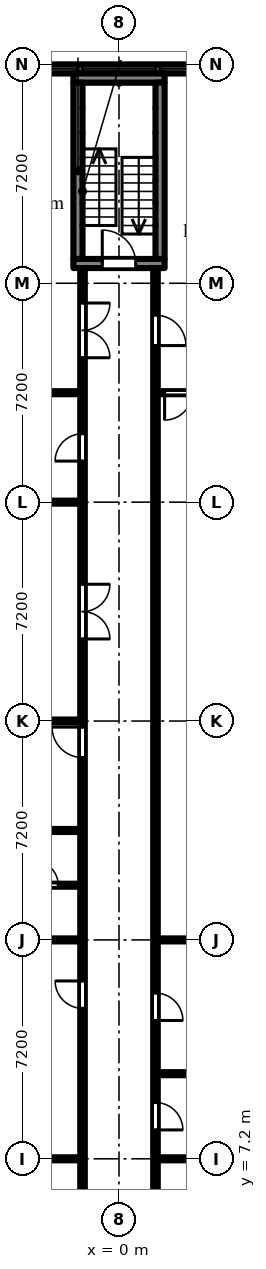
"""IFC4 building model, lengths in metres.
Left out: names, types, materials, properties, quantities, classifications, styles, units other than length and angle.
Written with IfcOpenShell. Run it as: python <this file> out.ifc"""

import sys

from ifc_helpers import new_model, si_unit, direction, frame, frame_2d, origin, place, context, subcontext, project, spatial, rectangle, extrude, element, fill, save


model = new_model("IFC4")
c1 = context("Model", 3, precision=1e-05, world=origin(), true_north=direction((0.0, 1.0)))
c2 = subcontext(c1, "Body", "Model", "MODEL_VIEW")
j1 = project(units=[si_unit("LENGTHUNIT", "METRE"), si_unit("PLANEANGLEUNIT", "RADIAN")], contexts=[c1])
p1 = place(None, origin())
s1 = spatial("IfcSite", under=j1, at=p1, CompositionType="ELEMENT")
p2 = place(p1, origin())
s2 = spatial("IfcBuilding", under=s1, at=p2, CompositionType="ELEMENT")
p3 = place(p2, frame((0.0, 0.0, 35.7)))
s3 = spatial("IfcBuildingStorey", under=s2, at=p3, CompositionType="ELEMENT", Elevation=35.7)
p4 = place(p3, frame((2.7, 43.05, 0.0), z_axis=(0.0, 0.0, 1.0), x_axis=(-1.0, 0.0, 0.0)))
e1 = element("IfcWall", 1, at=p4, inside=s3, PredefinedType="SOLIDWALL", context=c2, shape_type="SweptSolid", body=[
    extrude(rectangle(XDim=5.4, YDim=0.3, at=frame_2d((2.7, 0.0))), origin(), (0.0, 0.0, 1.0), 2.1),
])
p5 = place(p4, frame((1.5, 0.0, 0.2)))
e2 = element("IfcOpeningElement", 2, at=p5, cuts=e1, PredefinedType="OPENING", context=c2, shape_type="SweptSolid", body=[
    extrude(rectangle(XDim=2.4, YDim=1.85, at=frame_2d((1.2, 0.925))), frame((0.0, 0.16, 0.0), z_axis=(0.0, -1.0, 0.0), x_axis=(1.0, 0.0, 0.0)), (0.0, 0.0, 1.0), 0.32),
])
p6 = place(p4, frame((0.15, 0.0, 0.2)))
e3 = element("IfcOpeningElement", 3, at=p6, cuts=e1, PredefinedType="OPENING", context=c2, shape_type="SweptSolid", body=[
    extrude(rectangle(XDim=1.2, YDim=1.85, at=frame_2d((0.6, 0.925))), frame((0.0, 0.16, 0.0), z_axis=(0.0, -1.0, 0.0), x_axis=(1.0, 0.0, 0.0)), (0.0, 0.0, 1.0), 0.32),
])
p7 = place(p4, frame((4.05, 0.0, 0.2)))
e4 = element("IfcOpeningElement", 4, at=p7, cuts=e1, PredefinedType="OPENING", context=c2, shape_type="SweptSolid", body=[
    extrude(rectangle(XDim=1.2, YDim=1.85, at=frame_2d((0.6, 0.925))), frame((0.0, 0.16, 0.0), z_axis=(0.0, -1.0, 0.0), x_axis=(1.0, 0.0, 0.0)), (0.0, 0.0, 1.0), 0.32),
])
p8 = place(p3, frame((-1.5, 36.65, 0.0), z_axis=(0.0, 0.0, 1.0), x_axis=(1.0, 0.0, 0.0)))
e5 = element("IfcWall", 5, at=p8, inside=s3, PredefinedType="SHEAR", context=c2, shape_type="SweptSolid", body=[
    extrude(rectangle(XDim=3.0, YDim=0.3, at=frame_2d((1.5, 0.0))), origin(), (0.0, 0.0, 1.0), 2.575),
])
p9 = place(p8, frame((0.95, 0.0, 0.0)))
e6 = element("IfcOpeningElement", 6, at=p9, cuts=e5, PredefinedType="OPENING", context=c2, shape_type="SweptSolid", body=[
    extrude(rectangle(XDim=1.1, YDim=2.1, at=frame_2d((0.55, 1.05))), frame((0.0, 0.16, 0.0), z_axis=(0.0, -1.0, 0.0), x_axis=(1.0, 0.0, 0.0)), (0.0, 0.0, 1.0), 0.32),
])
p10 = place(p3, frame((-1.5, 42.75, 0.0), z_axis=(0.0, 0.0, 1.0), x_axis=(1.0, 0.0, 0.0)))
e7 = element("IfcWall", 7, at=p10, inside=s3, PredefinedType="SHEAR", context=c2, shape_type="SweptSolid", body=[
    extrude(rectangle(XDim=3.0, YDim=0.3, at=frame_2d((1.5, 0.0))), origin(), (0.0, 0.0, 1.0), 2.575),
])
for number, where, z_axis, x_axis in (
    (8, (-1.35, 36.8, 0.0), (0.0, 0.0, 1.0), (0.0, 1.0, 0.0)),
    (9, (1.35, 36.8, 0.0), (0.0, 0.0, 1.0), (0.0, 1.0, 0.0)),
):
    element("IfcWall", number, at=place(p3, frame(where, z_axis=z_axis, x_axis=x_axis)), inside=s3, PredefinedType="SHEAR", context=c2, shape_type="SweptSolid", body=[
        extrude(rectangle(XDim=5.8, YDim=0.3, at=frame_2d((2.9, 0.0))), origin(), (0.0, 0.0, 1.0), 2.575),
    ])
for number, where, z_axis, x_axis in (
    (10, (-6.9, 21.6, 0.0), (0.0, 0.0, 1.0), (1.0, 0.0, 0.0)),
    (11, (-6.9, 28.8, 0.0), (0.0, 0.0, 1.0), (1.0, 0.0, 0.0)),
    (12, (-6.9, 32.4, 0.0), (0.0, 0.0, 1.0), (1.0, 0.0, 0.0)),
):
    element("IfcWall", number, at=place(p3, frame(where, z_axis=z_axis, x_axis=x_axis)), inside=s3, PredefinedType="PARTITIONING", context=c2, shape_type="SweptSolid", body=[
        extrude(rectangle(XDim=5.625, YDim=0.1, at=frame_2d((2.812, 0.0))), origin(), (0.0, 0.0, 1.0), 2.575),
    ])
for number, where, z_axis, x_axis in (
    (13, (-3.9, 7.2, 0.0), (0.0, 0.0, 1.0), (1.0, 0.0, 0.0)),
    (14, (-3.9, 14.4, 0.0), (0.0, 0.0, 1.0), (1.0, 0.0, 0.0)),
):
    element("IfcWall", number, at=place(p3, frame(where, z_axis=z_axis, x_axis=x_axis)), inside=s3, PredefinedType="PARTITIONING", context=c2, shape_type="SweptSolid", body=[
        extrude(rectangle(XDim=2.625, YDim=0.1, at=frame_2d((1.312, 0.0))), origin(), (0.0, 0.0, 1.0), 2.575),
    ])
p11 = place(p3, frame((-3.55, 16.2, 0.0), z_axis=(0.0, 0.0, 1.0), x_axis=(1.0, 0.0, 0.0)))
e15 = element("IfcWall", 15, at=p11, inside=s3, PredefinedType="PARTITIONING", context=c2, shape_type="SweptSolid", body=[
    extrude(rectangle(XDim=2.275, YDim=0.1, at=frame_2d((1.138, 0.0))), origin(), (0.0, 0.0, 1.0), 2.575),
])
p12 = place(p11, frame((0.75, 0.0, 0.0)))
e16 = element("IfcOpeningElement", 16, at=p12, cuts=e15, PredefinedType="OPENING", context=c2, shape_type="SweptSolid", body=[
    extrude(rectangle(XDim=0.8, YDim=2.1, at=frame_2d((0.4, 1.05))), frame((0.0, 0.06, 0.0), z_axis=(0.0, -1.0, 0.0), x_axis=(1.0, 0.0, 0.0)), (0.0, 0.0, 1.0), 0.12),
])
p13 = place(p3, frame((-3.55, 18.0, 0.0), z_axis=(0.0, 0.0, 1.0), x_axis=(1.0, 0.0, 0.0)))
e17 = element("IfcWall", 17, at=p13, inside=s3, PredefinedType="PARTITIONING", context=c2, shape_type="SweptSolid", body=[
    extrude(rectangle(XDim=2.275, YDim=0.1, at=frame_2d((1.138, 0.0))), origin(), (0.0, 0.0, 1.0), 2.575),
])
p14 = place(p3, frame((-1.2, 1.275, 0.0), z_axis=(0.0, 0.0, 1.0), x_axis=(0.0, 1.0, 0.0)))
e18 = element("IfcWall", 18, at=p14, inside=s3, PredefinedType="PARTITIONING", context=c2, shape_type="SweptSolid", body=[
    extrude(rectangle(XDim=35.225, YDim=0.15, at=frame_2d((17.613, 0.0))), origin(), (0.0, 0.0, 1.0), 2.575),
])
p15 = place(p14, frame((3.575, 0.0, 0.0)))
e19 = element("IfcOpeningElement", 19, at=p15, cuts=e18, PredefinedType="OPENING", context=c2, shape_type="SweptSolid", body=[
    extrude(rectangle(XDim=0.9, YDim=2.1, at=frame_2d((0.45, 1.05))), frame((0.0, 0.085, 0.0), z_axis=(0.0, -1.0, 0.0), x_axis=(1.0, 0.0, 0.0)), (0.0, 0.0, 1.0), 0.17),
])
p16 = place(p14, frame((10.875, 0.0, 0.0)))
e20 = element("IfcOpeningElement", 20, at=p16, cuts=e18, PredefinedType="OPENING", context=c2, shape_type="SweptSolid", body=[
    extrude(rectangle(XDim=0.9, YDim=2.1, at=frame_2d((0.45, 1.05))), frame((0.0, 0.085, 0.0), z_axis=(0.0, -1.0, 0.0), x_axis=(1.0, 0.0, 0.0)), (0.0, 0.0, 1.0), 0.17),
])
p17 = place(p14, frame((19.125, 0.0, 0.0)))
e21 = element("IfcOpeningElement", 21, at=p17, cuts=e18, PredefinedType="OPENING", context=c2, shape_type="SweptSolid", body=[
    extrude(rectangle(XDim=1.0, YDim=2.1, at=frame_2d((0.5, 1.05))), frame((0.0, 0.085, 0.0), z_axis=(0.0, -1.0, 0.0), x_axis=(1.0, 0.0, 0.0)), (0.0, 0.0, 1.0), 0.17),
])
p18 = place(p14, frame((23.025, 0.0, 0.0)))
e22 = element("IfcOpeningElement", 22, at=p18, cuts=e18, PredefinedType="OPENING", context=c2, shape_type="SweptSolid", body=[
    extrude(rectangle(XDim=1.8, YDim=2.1, at=frame_2d((0.9, 1.05))), frame((0.0, 0.085, 0.0), z_axis=(0.0, -1.0, 0.0), x_axis=(1.0, 0.0, 0.0)), (0.0, 0.0, 1.0), 0.17),
])
p19 = place(p14, frame((28.875, 0.0, 0.0)))
e23 = element("IfcOpeningElement", 23, at=p19, cuts=e18, PredefinedType="OPENING", context=c2, shape_type="SweptSolid", body=[
    extrude(rectangle(XDim=0.9, YDim=2.1, at=frame_2d((0.45, 1.05))), frame((0.0, 0.085, 0.0), z_axis=(0.0, -1.0, 0.0), x_axis=(1.0, 0.0, 0.0)), (0.0, 0.0, 1.0), 0.17),
])
p20 = place(p14, frame((32.275, 0.0, 0.0)))
e24 = element("IfcOpeningElement", 24, at=p20, cuts=e18, PredefinedType="OPENING", context=c2, shape_type="SweptSolid", body=[
    extrude(rectangle(XDim=1.8, YDim=2.1, at=frame_2d((0.9, 1.05))), frame((0.0, 0.085, 0.0), z_axis=(0.0, -1.0, 0.0), x_axis=(1.0, 0.0, 0.0)), (0.0, 0.0, 1.0), 0.17),
])
p21 = place(p3, frame((1.2, 1.125, 0.0), z_axis=(0.0, 0.0, 1.0), x_axis=(0.0, 1.0, 0.0)))
e25 = element("IfcWall", 25, at=p21, inside=s3, PredefinedType="PARTITIONING", context=c2, shape_type="SweptSolid", body=[
    extrude(rectangle(XDim=35.375, YDim=0.15, at=frame_2d((17.688, 0.0))), origin(), (0.0, 0.0, 1.0), 2.575),
])
p22 = place(p21, frame((4.125, 0.0, 0.0)))
e26 = element("IfcOpeningElement", 26, at=p22, cuts=e25, PredefinedType="OPENING", context=c2, shape_type="SweptSolid", body=[
    extrude(rectangle(XDim=0.9, YDim=2.1, at=frame_2d((0.45, 1.05))), frame((0.0, 0.085, 0.0), z_axis=(0.0, -1.0, 0.0), x_axis=(1.0, 0.0, 0.0)), (0.0, 0.0, 1.0), 0.17),
])
p23 = place(p21, frame((7.025, 0.0, 0.0)))
e27 = element("IfcOpeningElement", 27, at=p23, cuts=e25, PredefinedType="OPENING", context=c2, shape_type="SweptSolid", body=[
    extrude(rectangle(XDim=0.9, YDim=2.1, at=frame_2d((0.45, 1.05))), frame((0.0, 0.085, 0.0), z_axis=(0.0, -1.0, 0.0), x_axis=(1.0, 0.0, 0.0)), (0.0, 0.0, 1.0), 0.17),
])
p24 = place(p21, frame((10.625, 0.0, 0.0)))
e28 = element("IfcOpeningElement", 28, at=p24, cuts=e25, PredefinedType="OPENING", context=c2, shape_type="SweptSolid", body=[
    extrude(rectangle(XDim=0.9, YDim=2.1, at=frame_2d((0.45, 1.05))), frame((0.0, 0.085, 0.0), z_axis=(0.0, -1.0, 0.0), x_axis=(1.0, 0.0, 0.0)), (0.0, 0.0, 1.0), 0.17),
])
p25 = place(p21, frame((32.825, 0.0, 0.0)))
e29 = element("IfcOpeningElement", 29, at=p25, cuts=e25, PredefinedType="OPENING", context=c2, shape_type="SweptSolid", body=[
    extrude(rectangle(XDim=1.0, YDim=2.1, at=frame_2d((0.5, 1.05))), frame((0.0, 0.085, 0.0), z_axis=(0.0, -1.0, 0.0), x_axis=(1.0, 0.0, 0.0)), (0.0, 0.0, 1.0), 0.17),
])
for number, where, z_axis, x_axis in (
    (30, (1.275, 7.2, 0.0), (0.0, 0.0, 1.0), (1.0, 0.0, 0.0)),
    (31, (1.275, 10.0, 0.0), (0.0, 0.0, 1.0), (1.0, 0.0, 0.0)),
):
    element("IfcWall", number, at=place(p3, frame(where, z_axis=z_axis, x_axis=x_axis)), inside=s3, PredefinedType="PARTITIONING", context=c2, shape_type="SweptSolid", body=[
        extrude(rectangle(XDim=2.625, YDim=0.1, at=frame_2d((1.312, 0.0))), origin(), (0.0, 0.0, 1.0), 2.575),
    ])
p26 = place(p3, frame((1.275, 14.4, 0.0), z_axis=(0.0, 0.0, 1.0), x_axis=(1.0, 0.0, 0.0)))
e32 = element("IfcWall", 32, at=p26, inside=s3, PredefinedType="PARTITIONING", context=c2, shape_type="SweptSolid", body=[
    extrude(rectangle(XDim=1.425, YDim=0.1, at=frame_2d((0.712, 0.0))), origin(), (0.0, 0.0, 1.0), 2.575),
])
p27 = place(p3, frame((1.275, 32.4, 0.0), z_axis=(0.0, 0.0, 1.0), x_axis=(1.0, 0.0, 0.0)))
e33 = element("IfcWall", 33, at=p27, inside=s3, PredefinedType="PARTITIONING", context=c2, shape_type="SweptSolid", body=[
    extrude(rectangle(XDim=5.625, YDim=0.1, at=frame_2d((2.812, 0.0))), origin(), (0.0, 0.0, 1.0), 2.575),
])
p28 = place(p27, frame((0.225, 0.0, 0.0)))
e34 = element("IfcOpeningElement", 34, at=p28, cuts=e33, PredefinedType="OPENING", context=c2, shape_type="SweptSolid", body=[
    extrude(rectangle(XDim=0.9, YDim=2.1, at=frame_2d((0.45, 1.05))), frame((0.0, 0.06, 0.0), z_axis=(0.0, -1.0, 0.0), x_axis=(1.0, 0.0, 0.0)), (0.0, 0.0, 1.0), 0.12),
])
p29 = place(p5, origin())
e35 = element("IfcWindow", 35, at=p29, inside=s3, PartitioningType="SINGLE_PANEL", PredefinedType="WINDOW", context=c2, shape_type="SweptSolid", body=[
    extrude(rectangle(XDim=2.4, YDim=1.85, at=frame_2d((1.2, 0.925))), frame((0.0, 0.03, 0.0), z_axis=(0.0, -1.0, 0.0), x_axis=(1.0, 0.0, 0.0)), (0.0, 0.0, 1.0), 0.06),
])
fill(e2, e35)
p30 = place(p6, origin())
e36 = element("IfcWindow", 36, at=p30, inside=s3, PartitioningType="SINGLE_PANEL", PredefinedType="WINDOW", context=c2, shape_type="SweptSolid", body=[
    extrude(rectangle(XDim=1.2, YDim=1.85, at=frame_2d((0.6, 0.925))), frame((0.0, 0.03, 0.0), z_axis=(0.0, -1.0, 0.0), x_axis=(1.0, 0.0, 0.0)), (0.0, 0.0, 1.0), 0.06),
])
fill(e3, e36)
p31 = place(p7, origin())
e37 = element("IfcWindow", 37, at=p31, inside=s3, PartitioningType="SINGLE_PANEL", PredefinedType="WINDOW", context=c2, shape_type="SweptSolid", body=[
    extrude(rectangle(XDim=1.2, YDim=1.85, at=frame_2d((0.6, 0.925))), frame((0.0, 0.03, 0.0), z_axis=(0.0, -1.0, 0.0), x_axis=(1.0, 0.0, 0.0)), (0.0, 0.0, 1.0), 0.06),
])
fill(e4, e37)
p32 = place(p9, origin())
e38 = element("IfcDoor", 38, at=p32, inside=s3, OperationType="SINGLE_SWING_LEFT", PredefinedType="DOOR", context=c2, shape_type="SweptSolid", body=[
    extrude(rectangle(XDim=1.1, YDim=2.1, at=frame_2d((0.55, 1.05))), frame((0.0, 0.025, 0.0), z_axis=(0.0, -1.0, 0.0), x_axis=(1.0, 0.0, 0.0)), (0.0, 0.0, 1.0), 0.05),
])
fill(e6, e38)
p33 = place(p16, origin())
e39 = element("IfcDoor", 39, at=p33, inside=s3, OperationType="SINGLE_SWING_RIGHT", PredefinedType="DOOR", context=c2, shape_type="SweptSolid", body=[
    extrude(rectangle(XDim=0.9, YDim=2.1, at=frame_2d((0.45, 1.05))), frame((0.0, 0.025, 0.0), z_axis=(0.0, -1.0, 0.0), x_axis=(1.0, 0.0, 0.0)), (0.0, 0.0, 1.0), 0.05),
])
fill(e20, e39)
p34 = place(p12, origin())
e40 = element("IfcDoor", 40, at=p34, inside=s3, OperationType="SINGLE_SWING_LEFT", PredefinedType="DOOR", context=c2, shape_type="SweptSolid", body=[
    extrude(rectangle(XDim=0.8, YDim=2.1, at=frame_2d((0.4, 1.05))), frame((0.0, 0.025, 0.0), z_axis=(0.0, -1.0, 0.0), x_axis=(1.0, 0.0, 0.0)), (0.0, 0.0, 1.0), 0.05),
])
fill(e16, e40)
p35 = place(p17, origin())
e41 = element("IfcDoor", 41, at=p35, inside=s3, OperationType="SINGLE_SWING_RIGHT", PredefinedType="DOOR", context=c2, shape_type="SweptSolid", body=[
    extrude(rectangle(XDim=1.0, YDim=2.1, at=frame_2d((0.5, 1.05))), frame((0.0, 0.025, 0.0), z_axis=(0.0, -1.0, 0.0), x_axis=(1.0, 0.0, 0.0)), (0.0, 0.0, 1.0), 0.05),
])
fill(e21, e41)
p36 = place(p18, frame((1.8, 0.0, 0.0), z_axis=(0.0, 0.0, 1.0), x_axis=(-1.0, 0.0, 0.0)))
e42 = element("IfcDoor", 42, at=p36, inside=s3, OperationType="DOUBLE_DOOR_DOUBLE_SWING", PredefinedType="DOOR", context=c2, shape_type="SweptSolid", body=[
    extrude(rectangle(XDim=1.8, YDim=2.1, at=frame_2d((0.9, 1.05))), frame((0.0, 0.025, 0.0), z_axis=(0.0, -1.0, 0.0), x_axis=(1.0, 0.0, 0.0)), (0.0, 0.0, 1.0), 0.05),
])
fill(e22, e42)
p37 = place(p19, origin())
e43 = element("IfcDoor", 43, at=p37, inside=s3, OperationType="SINGLE_SWING_LEFT", PredefinedType="DOOR", context=c2, shape_type="SweptSolid", body=[
    extrude(rectangle(XDim=0.9, YDim=2.1, at=frame_2d((0.45, 1.05))), frame((0.0, 0.025, 0.0), z_axis=(0.0, -1.0, 0.0), x_axis=(1.0, 0.0, 0.0)), (0.0, 0.0, 1.0), 0.05),
])
fill(e23, e43)
p38 = place(p20, frame((1.8, 0.0, 0.0), z_axis=(0.0, 0.0, 1.0), x_axis=(-1.0, 0.0, 0.0)))
e44 = element("IfcDoor", 44, at=p38, inside=s3, OperationType="DOUBLE_DOOR_DOUBLE_SWING", PredefinedType="DOOR", context=c2, shape_type="SweptSolid", body=[
    extrude(rectangle(XDim=1.8, YDim=2.1, at=frame_2d((0.9, 1.05))), frame((0.0, 0.025, 0.0), z_axis=(0.0, -1.0, 0.0), x_axis=(1.0, 0.0, 0.0)), (0.0, 0.0, 1.0), 0.05),
])
fill(e24, e44)
p39 = place(p23, frame((0.9, 0.0, 0.0), z_axis=(0.0, 0.0, 1.0), x_axis=(-1.0, 0.0, 0.0)))
e45 = element("IfcDoor", 45, at=p39, inside=s3, OperationType="SINGLE_SWING_RIGHT", PredefinedType="DOOR", context=c2, shape_type="SweptSolid", body=[
    extrude(rectangle(XDim=0.9, YDim=2.1, at=frame_2d((0.45, 1.05))), frame((0.0, 0.025, 0.0), z_axis=(0.0, -1.0, 0.0), x_axis=(1.0, 0.0, 0.0)), (0.0, 0.0, 1.0), 0.05),
])
fill(e27, e45)
p40 = place(p24, frame((0.9, 0.0, 0.0), z_axis=(0.0, 0.0, 1.0), x_axis=(-1.0, 0.0, 0.0)))
e46 = element("IfcDoor", 46, at=p40, inside=s3, OperationType="SINGLE_SWING_RIGHT", PredefinedType="DOOR", context=c2, shape_type="SweptSolid", body=[
    extrude(rectangle(XDim=0.9, YDim=2.1, at=frame_2d((0.45, 1.05))), frame((0.0, 0.025, 0.0), z_axis=(0.0, -1.0, 0.0), x_axis=(1.0, 0.0, 0.0)), (0.0, 0.0, 1.0), 0.05),
])
fill(e28, e46)
p41 = place(p25, frame((1.0, 0.0, 0.0), z_axis=(0.0, 0.0, 1.0), x_axis=(-1.0, 0.0, 0.0)))
e47 = element("IfcDoor", 47, at=p41, inside=s3, OperationType="SINGLE_SWING_RIGHT", PredefinedType="DOOR", context=c2, shape_type="SweptSolid", body=[
    extrude(rectangle(XDim=1.0, YDim=2.1, at=frame_2d((0.5, 1.05))), frame((0.0, 0.025, 0.0), z_axis=(0.0, -1.0, 0.0), x_axis=(1.0, 0.0, 0.0)), (0.0, 0.0, 1.0), 0.05),
])
fill(e29, e47)
p42 = place(p28, frame((0.9, 0.0, 0.0), z_axis=(0.0, 0.0, 1.0), x_axis=(-1.0, 0.0, 0.0)))
e48 = element("IfcDoor", 48, at=p42, inside=s3, OperationType="SINGLE_SWING_RIGHT", PredefinedType="DOOR", context=c2, shape_type="SweptSolid", body=[
    extrude(rectangle(XDim=0.9, YDim=2.1, at=frame_2d((0.45, 1.05))), frame((0.0, 0.025, 0.0), z_axis=(0.0, -1.0, 0.0), x_axis=(1.0, 0.0, 0.0)), (0.0, 0.0, 1.0), 0.05),
])
fill(e34, e48)
save(model, sys.argv[1])
